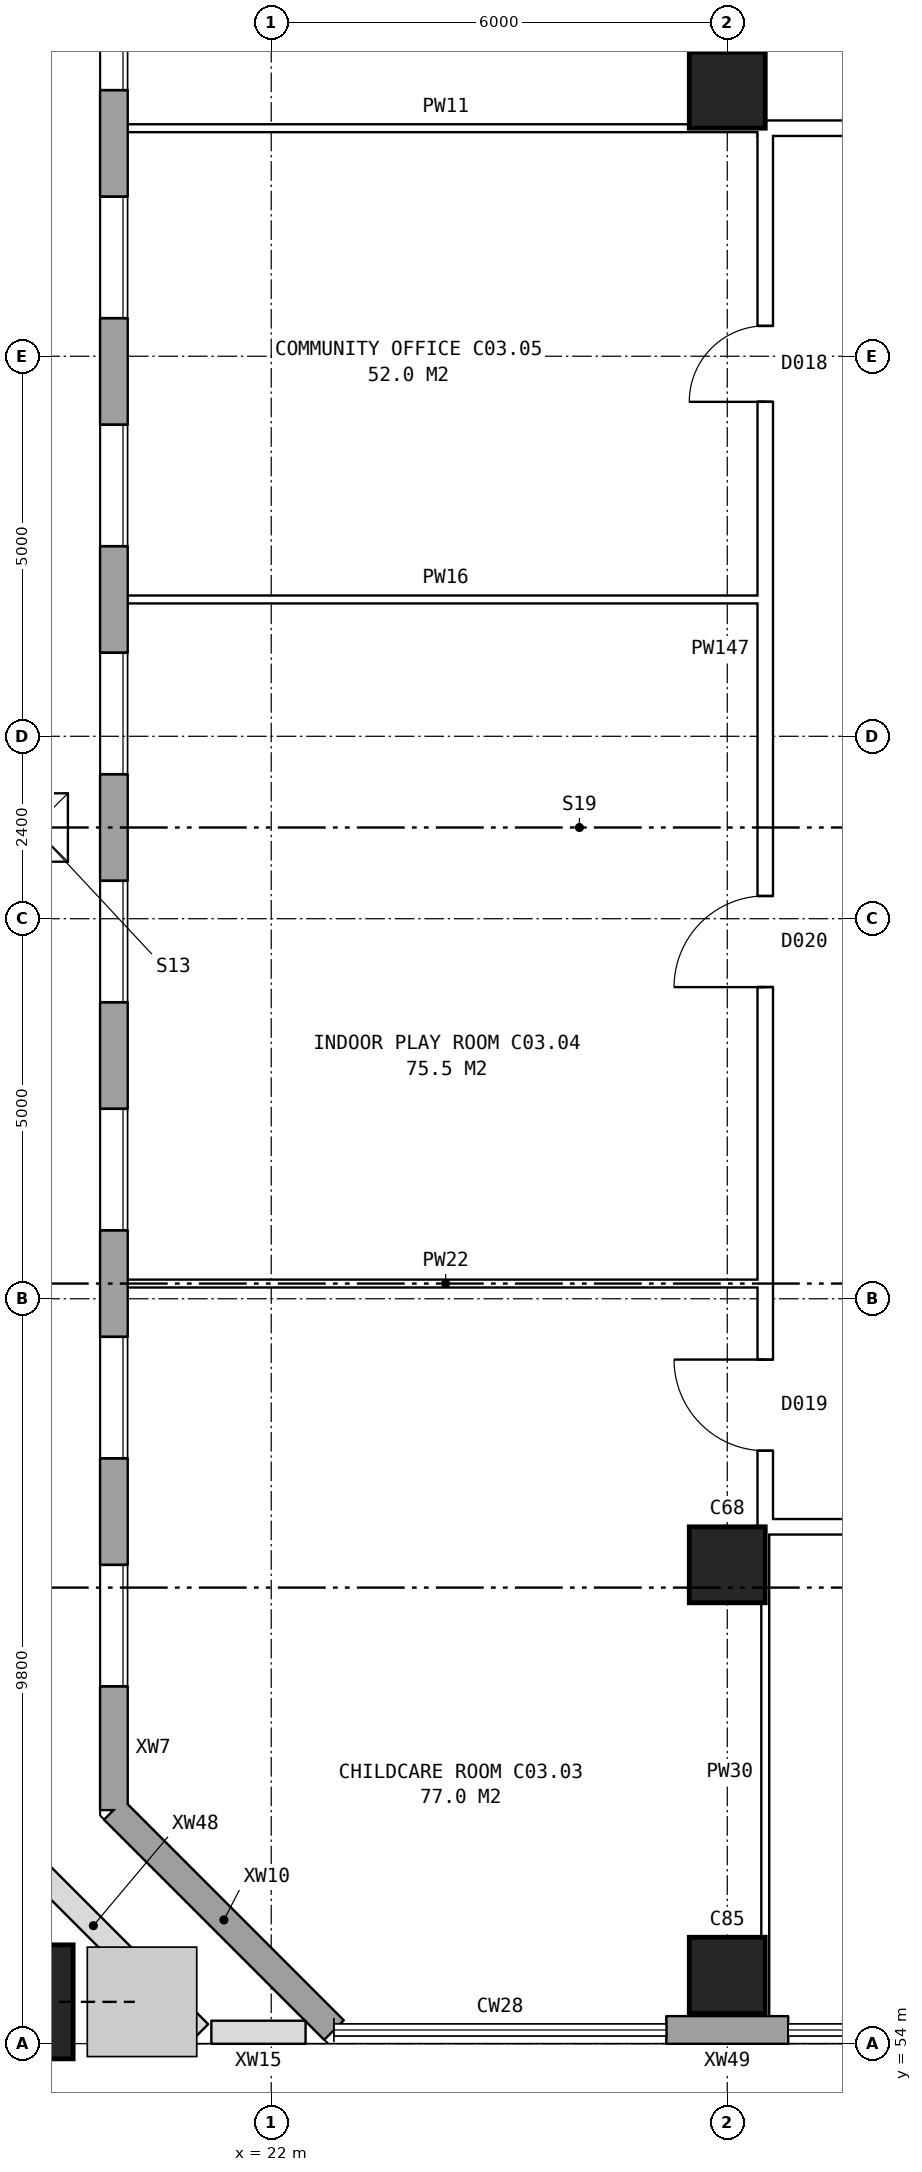
"""IFC4 building model, lengths in metres.
Left out: names, types, materials, properties, quantities, classifications, styles, units other than length and angle.
Written with IfcOpenShell. Run it as: python <this file> out.ifc"""

import sys

from ifc_helpers import new_model, si_unit, direction, frame, frame_2d, origin, origin_2d, place, context, subcontext, project, spatial, rectangle, hollow_rectangle, extrude, element, fill, save


model = new_model("IFC4")
c1 = context("Model", 3, precision=1e-05, world=origin(), true_north=direction((0.0, 1.0)))
c2 = subcontext(c1, "Body", "Model", "MODEL_VIEW")
j1 = project(units=[si_unit("LENGTHUNIT", "METRE"), si_unit("PLANEANGLEUNIT", "RADIAN")], contexts=[c1])
p1 = place(None, origin())
s1 = spatial("IfcSite", under=j1, at=p1, CompositionType="ELEMENT")
p2 = place(p1, origin())
s2 = spatial("IfcBuilding", under=s1, at=p2, CompositionType="ELEMENT")
p3 = place(p2, frame((0.0, 0.0, 14.7)))
s3 = spatial("IfcBuildingStorey", under=s2, at=p3, CompositionType="ELEMENT", Elevation=14.7)
for number, where, z_axis, x_axis in (
    (1, (28.0, 54.9, 0.0), (0.0, 0.0, 1.0), (1.0, 0.0, 0.0)),
    (2, (28.0, 60.3, 0.0), (0.0, 0.0, 1.0), (1.0, 0.0, 0.0)),
    (3, (28.0, 79.7, 0.0), (0.0, 0.0, 1.0), (1.0, 0.0, 0.0)),
):
    element("IfcColumn", number, at=place(p3, frame(where, z_axis=z_axis, x_axis=x_axis)), inside=s3, PredefinedType="COLUMN", context=c2, shape_type="SweptSolid", body=[
        extrude(rectangle(XDim=1.0, YDim=1.0, at=origin_2d()), origin(), (0.0, 0.0, 1.0), 4.0),
    ])
p4 = place(p3, frame((18.644, 54.55, 0.257), z_axis=(0.342481981042, 0.0, 0.939524397055), x_axis=(0.0, 1.0, 0.0)))
e4 = element("IfcColumn", 4, at=p4, inside=s3, PredefinedType="COLUMN", context=c2, shape_type="SweptSolid", body=[
    extrude(hollow_rectangle(XDim=1.5, YDim=1.5, WallThickness=0.08, at=origin_2d()), origin(), (0.0, 0.0, 1.0), 4.562),
])
p5 = place(p3, frame((19.93, 57.075, 0.0), z_axis=(0.0, 0.0, 1.0), x_axis=(0.707106781187, -0.707106781187, 0.0)))
e5 = element("IfcWall", 5, at=p5, inside=s3, PredefinedType="STANDARD", context=c2, shape_type="SweptSolid", body=[
    extrude(rectangle(XDim=4.094, YDim=0.36, at=frame_2d((2.047, 0.0))), origin(), (0.0, 0.0, 1.0), 4.0),
])
p6 = place(p3, frame((27.2, 54.18, 0.0), z_axis=(0.0, 0.0, 1.0), x_axis=(1.0, 0.0, 0.0)))
e6 = element("IfcWall", 6, at=p6, inside=s3, PredefinedType="STANDARD", context=c2, shape_type="SweptSolid", body=[
    extrude(rectangle(XDim=1.6, YDim=0.36, at=frame_2d((0.8, 0.0))), origin(), (0.0, 0.0, 1.0), 4.0),
])
p7 = place(p3, frame((19.93, 82.925, 0.0), z_axis=(0.0, 0.0, 1.0), x_axis=(0.0, -1.0, 0.0)))
e7 = element("IfcWall", 7, at=p7, inside=s3, PredefinedType="STANDARD", context=c2, shape_type="SweptSolid", body=[
    extrude(rectangle(XDim=25.851, YDim=0.36, at=frame_2d((12.925, 0.0))), origin(), (0.0, 0.0, 1.0), 4.0),
])
p8 = place(p7, frame((1.625, 0.0, 0.8)))
e8 = element("IfcOpeningElement", 8, at=p8, cuts=e7, PredefinedType="OPENING", context=c2, shape_type="SweptSolid", body=[
    extrude(rectangle(XDim=1.6, YDim=1.8, at=frame_2d((0.8, 0.9))), frame((0.0, 0.19, 0.0), z_axis=(0.0, -1.0, 0.0), x_axis=(1.0, 0.0, 0.0)), (0.0, 0.0, 1.0), 0.38),
])
p9 = place(p7, frame((4.625, 0.0, 0.8)))
e9 = element("IfcOpeningElement", 9, at=p9, cuts=e7, PredefinedType="OPENING", context=c2, shape_type="SweptSolid", body=[
    extrude(rectangle(XDim=1.6, YDim=1.8, at=frame_2d((0.8, 0.9))), frame((0.0, 0.19, 0.0), z_axis=(0.0, -1.0, 0.0), x_axis=(1.0, 0.0, 0.0)), (0.0, 0.0, 1.0), 0.38),
])
p10 = place(p7, frame((7.625, 0.0, 0.8)))
e10 = element("IfcOpeningElement", 10, at=p10, cuts=e7, PredefinedType="OPENING", context=c2, shape_type="SweptSolid", body=[
    extrude(rectangle(XDim=1.6, YDim=1.8, at=frame_2d((0.8, 0.9))), frame((0.0, 0.19, 0.0), z_axis=(0.0, -1.0, 0.0), x_axis=(1.0, 0.0, 0.0)), (0.0, 0.0, 1.0), 0.38),
])
p11 = place(p7, frame((10.625, 0.0, 0.8)))
e11 = element("IfcOpeningElement", 11, at=p11, cuts=e7, PredefinedType="OPENING", context=c2, shape_type="SweptSolid", body=[
    extrude(rectangle(XDim=1.6, YDim=1.8, at=frame_2d((0.8, 0.9))), frame((0.0, 0.19, 0.0), z_axis=(0.0, -1.0, 0.0), x_axis=(1.0, 0.0, 0.0)), (0.0, 0.0, 1.0), 0.38),
])
p12 = place(p7, frame((13.625, 0.0, 0.8)))
e12 = element("IfcOpeningElement", 12, at=p12, cuts=e7, PredefinedType="OPENING", context=c2, shape_type="SweptSolid", body=[
    extrude(rectangle(XDim=1.6, YDim=1.8, at=frame_2d((0.8, 0.9))), frame((0.0, 0.19, 0.0), z_axis=(0.0, -1.0, 0.0), x_axis=(1.0, 0.0, 0.0)), (0.0, 0.0, 1.0), 0.38),
])
p13 = place(p7, frame((16.625, 0.0, 0.8)))
e13 = element("IfcOpeningElement", 13, at=p13, cuts=e7, PredefinedType="OPENING", context=c2, shape_type="SweptSolid", body=[
    extrude(rectangle(XDim=1.6, YDim=1.8, at=frame_2d((0.8, 0.9))), frame((0.0, 0.19, 0.0), z_axis=(0.0, -1.0, 0.0), x_axis=(1.0, 0.0, 0.0)), (0.0, 0.0, 1.0), 0.38),
])
p14 = place(p7, frame((19.625, 0.0, 0.8)))
e14 = element("IfcOpeningElement", 14, at=p14, cuts=e7, PredefinedType="OPENING", context=c2, shape_type="SweptSolid", body=[
    extrude(rectangle(XDim=1.6, YDim=1.8, at=frame_2d((0.8, 0.9))), frame((0.0, 0.19, 0.0), z_axis=(0.0, -1.0, 0.0), x_axis=(1.0, 0.0, 0.0)), (0.0, 0.0, 1.0), 0.38),
])
p15 = place(p7, frame((22.625, 0.0, 0.8)))
e15 = element("IfcOpeningElement", 15, at=p15, cuts=e7, PredefinedType="OPENING", context=c2, shape_type="SweptSolid", body=[
    extrude(rectangle(XDim=1.6, YDim=1.8, at=frame_2d((0.8, 0.9))), frame((0.0, 0.19, 0.0), z_axis=(0.0, -1.0, 0.0), x_axis=(1.0, 0.0, 0.0)), (0.0, 0.0, 1.0), 0.38),
])
p16 = place(p3, frame((18.258, 56.955, 0.0), z_axis=(0.0, 0.0, 1.0), x_axis=(0.70707600329, -0.707137557743, 0.0)))
e16 = element("IfcWall", 16, at=p16, inside=s3, PredefinedType="PARAPET", context=c2, shape_type="SweptSolid", body=[
    extrude(rectangle(XDim=3.966, YDim=0.3, at=frame_2d((1.983, 0.0))), origin(), (0.0, 0.0, 1.0), 1.1),
])
p17 = place(p3, frame((21.214, 54.15, 0.0), z_axis=(0.0, 0.0, 1.0), x_axis=(1.0, 0.0, 0.0)))
e17 = element("IfcWall", 17, at=p17, inside=s3, PredefinedType="PARAPET", context=c2, shape_type="SweptSolid", body=[
    extrude(rectangle(XDim=1.236, YDim=0.3, at=frame_2d((0.618, 0.0))), origin(), (0.0, 0.0, 1.0), 1.1),
])
p18 = place(p3, frame((28.4, 60.8, 0.0), z_axis=(0.0, 0.0, 1.0), x_axis=(1.0, 0.0, 0.0)))
e18 = element("IfcWall", 18, at=p18, inside=s3, PredefinedType="PARTITIONING", context=c2, shape_type="SweptSolid", body=[
    extrude(rectangle(XDim=47.36, YDim=0.2, at=frame_2d((23.68, 0.0))), origin(), (0.0, 0.0, 1.0), 4.0),
])
p19 = place(p18, frame((3.85, 0.0, 0.0)))
e19 = element("IfcOpeningElement", 19, at=p19, cuts=e18, PredefinedType="OPENING", context=c2, shape_type="SweptSolid", body=[
    extrude(rectangle(XDim=1.0, YDim=2.1, at=frame_2d((0.5, 1.05))), frame((0.0, 0.11, 0.0), z_axis=(0.0, -1.0, 0.0), x_axis=(1.0, 0.0, 0.0)), (0.0, 0.0, 1.0), 0.22),
])
p20 = place(p18, frame((12.5, 0.0, 0.0)))
e20 = element("IfcOpeningElement", 20, at=p20, cuts=e18, PredefinedType="OPENING", context=c2, shape_type="SweptSolid", body=[
    extrude(rectangle(XDim=1.0, YDim=2.1, at=frame_2d((0.5, 1.05))), frame((0.0, 0.11, 0.0), z_axis=(0.0, -1.0, 0.0), x_axis=(1.0, 0.0, 0.0)), (0.0, 0.0, 1.0), 0.22),
])
p21 = place(p18, frame((17.0, 0.0, 0.0)))
e21 = element("IfcOpeningElement", 21, at=p21, cuts=e18, PredefinedType="OPENING", context=c2, shape_type="SweptSolid", body=[
    extrude(rectangle(XDim=1.2, YDim=2.1, at=frame_2d((0.6, 1.05))), frame((0.0, 0.11, 0.0), z_axis=(0.0, -1.0, 0.0), x_axis=(1.0, 0.0, 0.0)), (0.0, 0.0, 1.0), 0.22),
])
p22 = place(p18, frame((23.0, 0.0, 0.0)))
e22 = element("IfcOpeningElement", 22, at=p22, cuts=e18, PredefinedType="OPENING", context=c2, shape_type="SweptSolid", body=[
    extrude(rectangle(XDim=1.2, YDim=2.1, at=frame_2d((0.6, 1.05))), frame((0.0, 0.11, 0.0), z_axis=(0.0, -1.0, 0.0), x_axis=(1.0, 0.0, 0.0)), (0.0, 0.0, 1.0), 0.22),
])
p23 = place(p18, frame((29.1, 0.0, 0.0)))
e23 = element("IfcOpeningElement", 23, at=p23, cuts=e18, PredefinedType="OPENING", context=c2, shape_type="SweptSolid", body=[
    extrude(rectangle(XDim=1.0, YDim=2.1, at=frame_2d((0.5, 1.05))), frame((0.0, 0.11, 0.0), z_axis=(0.0, -1.0, 0.0), x_axis=(1.0, 0.0, 0.0)), (0.0, 0.0, 1.0), 0.22),
])
p24 = place(p18, frame((33.65, 0.0, 0.0)))
e24 = element("IfcOpeningElement", 24, at=p24, cuts=e18, PredefinedType="OPENING", context=c2, shape_type="SweptSolid", body=[
    extrude(rectangle(XDim=1.0, YDim=2.1, at=frame_2d((0.5, 1.05))), frame((0.0, 0.11, 0.0), z_axis=(0.0, -1.0, 0.0), x_axis=(1.0, 0.0, 0.0)), (0.0, 0.0, 1.0), 0.22),
])
p25 = place(p18, frame((40.97, 0.0, 0.0)))
e25 = element("IfcOpeningElement", 25, at=p25, cuts=e18, PredefinedType="OPENING", context=c2, shape_type="SweptSolid", body=[
    extrude(rectangle(XDim=1.0, YDim=2.1, at=frame_2d((0.5, 1.05))), frame((0.0, 0.11, 0.0), z_axis=(0.0, -1.0, 0.0), x_axis=(1.0, 0.0, 0.0)), (0.0, 0.0, 1.0), 0.22),
])
for number, where, z_axis, x_axis in (
    (26, (19.99, 64.0, 0.0), (0.0, 0.0, 1.0), (1.0, 0.0, 0.0)),
    (27, (19.99, 73.0, 0.0), (0.0, 0.0, 1.0), (1.0, 0.0, 0.0)),
):
    element("IfcWall", number, at=place(p3, frame(where, z_axis=z_axis, x_axis=x_axis)), inside=s3, PredefinedType="PARTITIONING", context=c2, shape_type="SweptSolid", body=[
        extrude(rectangle(XDim=8.61, YDim=0.1, at=frame_2d((4.305, 0.0))), origin(), (0.0, 0.0, 1.0), 4.0),
    ])
p26 = place(p3, frame((28.398, 79.2, 0.0), z_axis=(0.0, 0.0, 1.0), x_axis=(1.0, 0.0, 0.0)))
e28 = element("IfcWall", 28, at=p26, inside=s3, PredefinedType="PARTITIONING", context=c2, shape_type="SweptSolid", body=[
    extrude(rectangle(XDim=47.362, YDim=0.2, at=frame_2d((23.681, 0.0))), origin(), (0.0, 0.0, 1.0), 4.0),
])
p27 = place(p26, frame((1.531, 0.0, 0.0)))
e29 = element("IfcOpeningElement", 29, at=p27, cuts=e28, PredefinedType="OPENING", context=c2, shape_type="SweptSolid", body=[
    extrude(rectangle(XDim=1.0, YDim=2.1, at=frame_2d((0.5, 1.05))), frame((0.0, 0.11, 0.0), z_axis=(0.0, -1.0, 0.0), x_axis=(1.0, 0.0, 0.0)), (0.0, 0.0, 1.0), 0.22),
])
p28 = place(p26, frame((5.782, 0.0, 0.0)))
e30 = element("IfcOpeningElement", 30, at=p28, cuts=e28, PredefinedType="OPENING", context=c2, shape_type="SweptSolid", body=[
    extrude(rectangle(XDim=1.0, YDim=2.1, at=frame_2d((0.5, 1.05))), frame((0.0, 0.11, 0.0), z_axis=(0.0, -1.0, 0.0), x_axis=(1.0, 0.0, 0.0)), (0.0, 0.0, 1.0), 0.22),
])
p29 = place(p26, frame((12.502, 0.0, 0.0)))
e31 = element("IfcOpeningElement", 31, at=p29, cuts=e28, PredefinedType="OPENING", context=c2, shape_type="SweptSolid", body=[
    extrude(rectangle(XDim=1.0, YDim=2.1, at=frame_2d((0.5, 1.05))), frame((0.0, 0.11, 0.0), z_axis=(0.0, -1.0, 0.0), x_axis=(1.0, 0.0, 0.0)), (0.0, 0.0, 1.0), 0.22),
])
p30 = place(p26, frame((17.102, 0.0, 0.0)))
e32 = element("IfcOpeningElement", 32, at=p30, cuts=e28, PredefinedType="OPENING", context=c2, shape_type="SweptSolid", body=[
    extrude(rectangle(XDim=1.0, YDim=2.1, at=frame_2d((0.5, 1.05))), frame((0.0, 0.11, 0.0), z_axis=(0.0, -1.0, 0.0), x_axis=(1.0, 0.0, 0.0)), (0.0, 0.0, 1.0), 0.22),
])
p31 = place(p26, frame((23.102, 0.0, 0.0)))
e33 = element("IfcOpeningElement", 33, at=p31, cuts=e28, PredefinedType="OPENING", context=c2, shape_type="SweptSolid", body=[
    extrude(rectangle(XDim=1.0, YDim=2.1, at=frame_2d((0.5, 1.05))), frame((0.0, 0.11, 0.0), z_axis=(0.0, -1.0, 0.0), x_axis=(1.0, 0.0, 0.0)), (0.0, 0.0, 1.0), 0.22),
])
p32 = place(p26, frame((29.102, 0.0, 0.0)))
e34 = element("IfcOpeningElement", 34, at=p32, cuts=e28, PredefinedType="OPENING", context=c2, shape_type="SweptSolid", body=[
    extrude(rectangle(XDim=1.0, YDim=2.1, at=frame_2d((0.5, 1.05))), frame((0.0, 0.11, 0.0), z_axis=(0.0, -1.0, 0.0), x_axis=(1.0, 0.0, 0.0)), (0.0, 0.0, 1.0), 0.22),
])
p33 = place(p26, frame((33.652, 0.0, 0.0)))
e35 = element("IfcOpeningElement", 35, at=p33, cuts=e28, PredefinedType="OPENING", context=c2, shape_type="SweptSolid", body=[
    extrude(rectangle(XDim=1.0, YDim=2.1, at=frame_2d((0.5, 1.05))), frame((0.0, 0.11, 0.0), z_axis=(0.0, -1.0, 0.0), x_axis=(1.0, 0.0, 0.0)), (0.0, 0.0, 1.0), 0.22),
])
p34 = place(p26, frame((36.652, 0.0, 0.0)))
e36 = element("IfcOpeningElement", 36, at=p34, cuts=e28, PredefinedType="OPENING", context=c2, shape_type="SweptSolid", body=[
    extrude(rectangle(XDim=1.0, YDim=2.1, at=frame_2d((0.5, 1.05))), frame((0.0, 0.11, 0.0), z_axis=(0.0, -1.0, 0.0), x_axis=(1.0, 0.0, 0.0)), (0.0, 0.0, 1.0), 0.22),
])
p35 = place(p26, frame((39.602, 0.0, 0.0)))
e37 = element("IfcOpeningElement", 37, at=p35, cuts=e28, PredefinedType="OPENING", context=c2, shape_type="SweptSolid", body=[
    extrude(rectangle(XDim=1.0, YDim=2.1, at=frame_2d((0.5, 1.05))), frame((0.0, 0.11, 0.0), z_axis=(0.0, -1.0, 0.0), x_axis=(1.0, 0.0, 0.0)), (0.0, 0.0, 1.0), 0.22),
])
p36 = place(p26, frame((42.502, 0.0, 0.0)))
e38 = element("IfcOpeningElement", 38, at=p36, cuts=e28, PredefinedType="OPENING", context=c2, shape_type="SweptSolid", body=[
    extrude(rectangle(XDim=1.0, YDim=2.1, at=frame_2d((0.5, 1.05))), frame((0.0, 0.11, 0.0), z_axis=(0.0, -1.0, 0.0), x_axis=(1.0, 0.0, 0.0)), (0.0, 0.0, 1.0), 0.22),
])
p37 = place(p26, frame((45.322, 0.0, 0.0)))
e39 = element("IfcOpeningElement", 39, at=p37, cuts=e28, PredefinedType="OPENING", context=c2, shape_type="SweptSolid", body=[
    extrude(rectangle(XDim=1.0, YDim=2.1, at=frame_2d((0.5, 1.05))), frame((0.0, 0.11, 0.0), z_axis=(0.0, -1.0, 0.0), x_axis=(1.0, 0.0, 0.0)), (0.0, 0.0, 1.0), 0.22),
])
p38 = place(p3, frame((19.99, 79.2, 0.0), z_axis=(0.0, 0.0, 1.0), x_axis=(1.0, 0.0, 0.0)))
e40 = element("IfcWall", 40, at=p38, inside=s3, PredefinedType="PARTITIONING", context=c2, shape_type="SweptSolid", body=[
    extrude(rectangle(XDim=8.612, YDim=0.1, at=frame_2d((4.306, 0.0))), origin(), (0.0, 0.0, 1.0), 4.0),
])
p39 = place(p3, frame((28.5, 60.7, 0.0), z_axis=(0.0, 0.0, 1.0), x_axis=(0.0, 1.0, 0.0)))
e41 = element("IfcWall", 41, at=p39, inside=s3, PredefinedType="PARTITIONING", context=c2, shape_type="SweptSolid", body=[
    extrude(rectangle(XDim=18.6, YDim=0.2, at=frame_2d((9.3, 0.0))), origin(), (0.0, 0.0, 1.0), 4.0),
])
p40 = place(p39, frame((1.1, 0.0, 0.0)))
e42 = element("IfcOpeningElement", 42, at=p40, cuts=e41, PredefinedType="OPENING", context=c2, shape_type="SweptSolid", body=[
    extrude(rectangle(XDim=1.2, YDim=2.1, at=frame_2d((0.6, 1.05))), frame((0.0, 0.11, 0.0), z_axis=(0.0, -1.0, 0.0), x_axis=(1.0, 0.0, 0.0)), (0.0, 0.0, 1.0), 0.22),
])
p41 = place(p39, frame((7.2, 0.0, 0.0)))
e43 = element("IfcOpeningElement", 43, at=p41, cuts=e41, PredefinedType="OPENING", context=c2, shape_type="SweptSolid", body=[
    extrude(rectangle(XDim=1.2, YDim=2.1, at=frame_2d((0.6, 1.05))), frame((0.0, 0.11, 0.0), z_axis=(0.0, -1.0, 0.0), x_axis=(1.0, 0.0, 0.0)), (0.0, 0.0, 1.0), 0.22),
])
p42 = place(p39, frame((14.9, 0.0, 0.0)))
e44 = element("IfcOpeningElement", 44, at=p42, cuts=e41, PredefinedType="OPENING", context=c2, shape_type="SweptSolid", body=[
    extrude(rectangle(XDim=1.0, YDim=2.1, at=frame_2d((0.5, 1.05))), frame((0.0, 0.11, 0.0), z_axis=(0.0, -1.0, 0.0), x_axis=(1.0, 0.0, 0.0)), (0.0, 0.0, 1.0), 0.22),
])
p43 = place(p3, frame((28.5, 54.24, 0.0), z_axis=(0.0, 0.0, 1.0), x_axis=(0.0, 1.0, 0.0)))
e45 = element("IfcWall", 45, at=p43, inside=s3, PredefinedType="PARTITIONING", context=c2, shape_type="SweptSolid", body=[
    extrude(rectangle(XDim=6.66, YDim=0.1, at=frame_2d((3.33, 0.0))), origin(), (0.0, 0.0, 1.0), 4.0),
])
p44 = place(p8, origin())
e46 = element("IfcWindow", 46, at=p44, inside=s3, PartitioningType="SINGLE_PANEL", PredefinedType="WINDOW", context=c2, shape_type="SweptSolid", body=[
    extrude(rectangle(XDim=1.6, YDim=1.8, at=frame_2d((0.8, 0.9))), frame((0.0, 0.15, 0.0), z_axis=(0.0, -1.0, 0.0), x_axis=(1.0, 0.0, 0.0)), (0.0, 0.0, 1.0), 0.06),
])
fill(e8, e46)
p45 = place(p9, origin())
e47 = element("IfcWindow", 47, at=p45, inside=s3, PartitioningType="SINGLE_PANEL", PredefinedType="WINDOW", context=c2, shape_type="SweptSolid", body=[
    extrude(rectangle(XDim=1.6, YDim=1.8, at=frame_2d((0.8, 0.9))), frame((0.0, 0.15, 0.0), z_axis=(0.0, -1.0, 0.0), x_axis=(1.0, 0.0, 0.0)), (0.0, 0.0, 1.0), 0.06),
])
fill(e9, e47)
p46 = place(p10, origin())
e48 = element("IfcWindow", 48, at=p46, inside=s3, PartitioningType="SINGLE_PANEL", PredefinedType="WINDOW", context=c2, shape_type="SweptSolid", body=[
    extrude(rectangle(XDim=1.6, YDim=1.8, at=frame_2d((0.8, 0.9))), frame((0.0, 0.15, 0.0), z_axis=(0.0, -1.0, 0.0), x_axis=(1.0, 0.0, 0.0)), (0.0, 0.0, 1.0), 0.06),
])
fill(e10, e48)
p47 = place(p11, origin())
e49 = element("IfcWindow", 49, at=p47, inside=s3, PartitioningType="SINGLE_PANEL", PredefinedType="WINDOW", context=c2, shape_type="SweptSolid", body=[
    extrude(rectangle(XDim=1.6, YDim=1.8, at=frame_2d((0.8, 0.9))), frame((0.0, 0.15, 0.0), z_axis=(0.0, -1.0, 0.0), x_axis=(1.0, 0.0, 0.0)), (0.0, 0.0, 1.0), 0.06),
])
fill(e11, e49)
p48 = place(p12, origin())
e50 = element("IfcWindow", 50, at=p48, inside=s3, PartitioningType="SINGLE_PANEL", PredefinedType="WINDOW", context=c2, shape_type="SweptSolid", body=[
    extrude(rectangle(XDim=1.6, YDim=1.8, at=frame_2d((0.8, 0.9))), frame((0.0, 0.15, 0.0), z_axis=(0.0, -1.0, 0.0), x_axis=(1.0, 0.0, 0.0)), (0.0, 0.0, 1.0), 0.06),
])
fill(e12, e50)
p49 = place(p13, origin())
e51 = element("IfcWindow", 51, at=p49, inside=s3, PartitioningType="SINGLE_PANEL", PredefinedType="WINDOW", context=c2, shape_type="SweptSolid", body=[
    extrude(rectangle(XDim=1.6, YDim=1.8, at=frame_2d((0.8, 0.9))), frame((0.0, 0.15, 0.0), z_axis=(0.0, -1.0, 0.0), x_axis=(1.0, 0.0, 0.0)), (0.0, 0.0, 1.0), 0.06),
])
fill(e13, e51)
p50 = place(p14, origin())
e52 = element("IfcWindow", 52, at=p50, inside=s3, PartitioningType="SINGLE_PANEL", PredefinedType="WINDOW", context=c2, shape_type="SweptSolid", body=[
    extrude(rectangle(XDim=1.6, YDim=1.8, at=frame_2d((0.8, 0.9))), frame((0.0, 0.15, 0.0), z_axis=(0.0, -1.0, 0.0), x_axis=(1.0, 0.0, 0.0)), (0.0, 0.0, 1.0), 0.06),
])
fill(e14, e52)
p51 = place(p15, origin())
e53 = element("IfcWindow", 53, at=p51, inside=s3, PartitioningType="SINGLE_PANEL", PredefinedType="WINDOW", context=c2, shape_type="SweptSolid", body=[
    extrude(rectangle(XDim=1.6, YDim=1.8, at=frame_2d((0.8, 0.9))), frame((0.0, 0.15, 0.0), z_axis=(0.0, -1.0, 0.0), x_axis=(1.0, 0.0, 0.0)), (0.0, 0.0, 1.0), 0.06),
])
fill(e15, e53)
p52 = place(p3, frame((0.0, 0.0, -0.3)))
p53 = place(p52, frame((18.875, 70.0, 0.0)))
p54 = place(p53, frame((0.0, 0.0, 0.25)))
e54 = element("IfcWindow", 54, at=p54, inside=s3, PartitioningType="SINGLE_PANEL", PredefinedType="SKYLIGHT", context=c2, shape_type="SweptSolid", body=[
    extrude(rectangle(XDim=0.9, YDim=0.9, at=origin_2d()), origin(), (0.0, 0.0, 1.0), 0.05),
])
p55 = place(p40, origin())
e55 = element("IfcDoor", 55, at=p55, inside=s3, OperationType="SINGLE_SWING_RIGHT", PredefinedType="DOOR", context=c2, shape_type="SweptSolid", body=[
    extrude(rectangle(XDim=1.2, YDim=2.1, at=frame_2d((0.6, 1.05))), frame((0.0, 0.025, 0.0), z_axis=(0.0, -1.0, 0.0), x_axis=(1.0, 0.0, 0.0)), (0.0, 0.0, 1.0), 0.05),
])
fill(e42, e55)
p56 = place(p41, origin())
e56 = element("IfcDoor", 56, at=p56, inside=s3, OperationType="SINGLE_SWING_LEFT", PredefinedType="DOOR", context=c2, shape_type="SweptSolid", body=[
    extrude(rectangle(XDim=1.2, YDim=2.1, at=frame_2d((0.6, 1.05))), frame((0.0, 0.025, 0.0), z_axis=(0.0, -1.0, 0.0), x_axis=(1.0, 0.0, 0.0)), (0.0, 0.0, 1.0), 0.05),
])
fill(e43, e56)
p57 = place(p42, origin())
e57 = element("IfcDoor", 57, at=p57, inside=s3, OperationType="SINGLE_SWING_LEFT", PredefinedType="DOOR", context=c2, shape_type="SweptSolid", body=[
    extrude(rectangle(XDim=1.0, YDim=2.1, at=frame_2d((0.5, 1.05))), frame((0.0, 0.025, 0.0), z_axis=(0.0, -1.0, 0.0), x_axis=(1.0, 0.0, 0.0)), (0.0, 0.0, 1.0), 0.05),
])
fill(e44, e57)
save(model, sys.argv[1])
